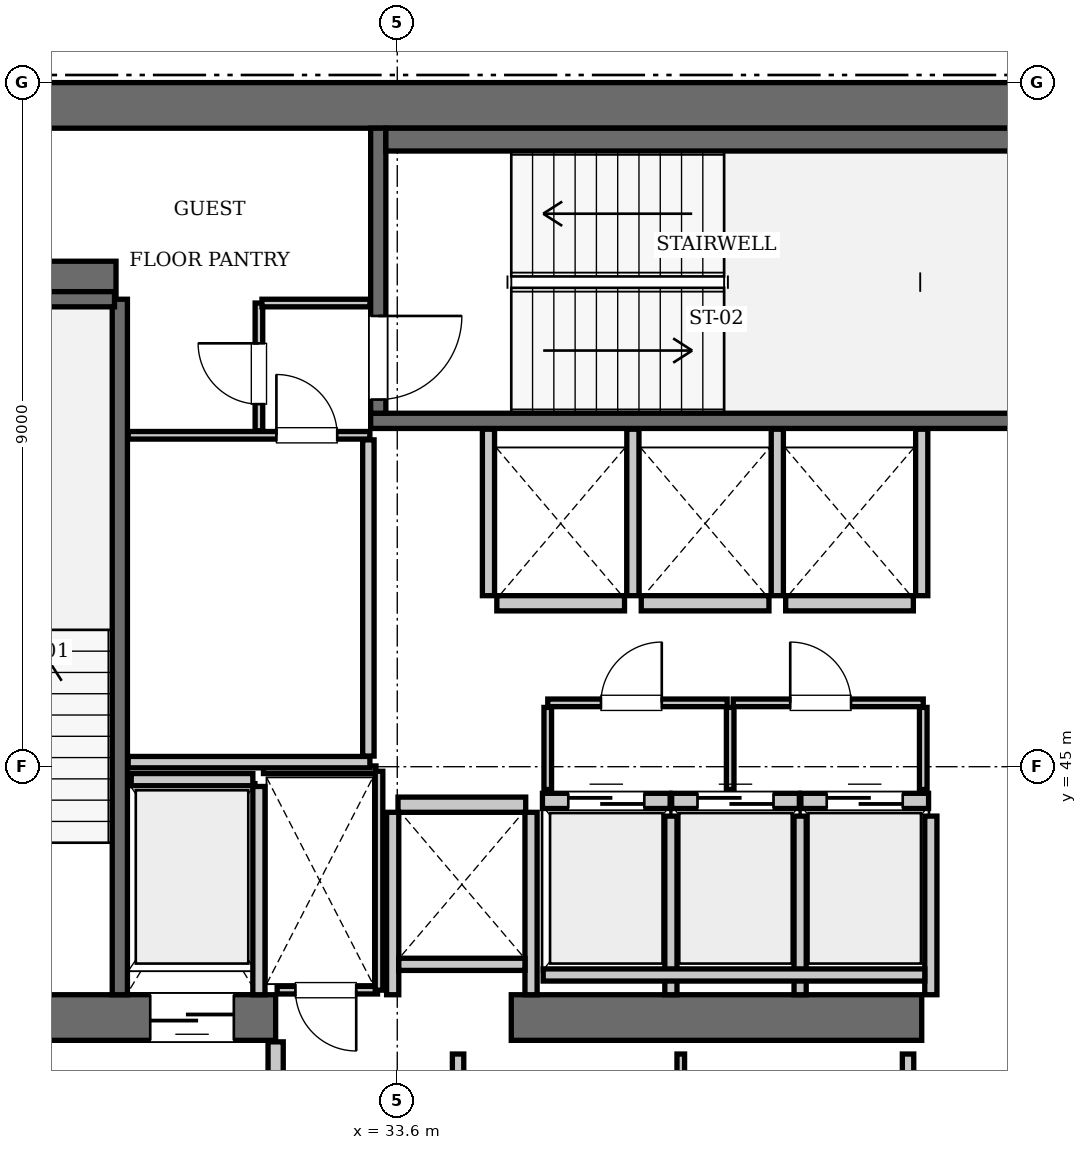
"""IFC4 building model, lengths in metres.
Left out: names, types, materials, properties, quantities, classifications, styles, units other than length and angle.
Written with IfcOpenShell. Run it as: python <this file> out.ifc"""

import sys

from ifc_helpers import new_model, si_unit, direction, frame, frame_2d, origin, place, context, subcontext, project, spatial, rectangle, extrude, element, fill, save


model = new_model("IFC4")
c1 = context("Model", 3, precision=1e-05, world=origin(), true_north=direction((0.0, 1.0)))
c2 = subcontext(c1, "Body", "Model", "MODEL_VIEW")
j1 = project(units=[si_unit("LENGTHUNIT", "METRE"), si_unit("PLANEANGLEUNIT", "RADIAN")], contexts=[c1])
p1 = place(None, origin())
s1 = spatial("IfcSite", under=j1, at=p1, CompositionType="ELEMENT")
p2 = place(p1, origin())
s2 = spatial("IfcBuilding", under=s1, at=p2, CompositionType="ELEMENT")
p3 = place(p2, frame((0.0, 0.0, 266.35)))
s3 = spatial("IfcBuildingStorey", under=s2, at=p3, CompositionType="ELEMENT", Elevation=266.35)
p4 = place(p3, frame((25.2, 53.7, 0.0), z_axis=(0.0, 0.0, 1.0), x_axis=(1.0, 0.0, 0.0)))
e1 = element("IfcWall", 1, at=p4, inside=s3, PredefinedType="SHEAR", context=c2, shape_type="SweptSolid", body=[
    extrude(rectangle(XDim=25.2, YDim=0.6, at=frame_2d((12.6, 0.0))), origin(), (0.0, 0.0, 1.0), 3.85),
])
p5 = place(p3, frame((25.2, 41.7, 0.0), z_axis=(0.0, 0.0, 1.0), x_axis=(1.0, 0.0, 0.0)))
e2 = element("IfcWall", 2, at=p5, inside=s3, PredefinedType="SHEAR", context=c2, shape_type="SweptSolid", body=[
    extrude(rectangle(XDim=6.8, YDim=0.6, at=frame_2d((3.4, 0.0))), origin(), (0.0, 0.0, 1.0), 3.85),
])
p6 = place(p5, frame((1.65, 0.0, 0.0)))
e3 = element("IfcOpeningElement", 3, at=p6, cuts=e2, PredefinedType="OPENING", context=c2, shape_type="SweptSolid", body=[
    extrude(rectangle(XDim=1.15, YDim=2.15, at=frame_2d((0.575, 1.075))), frame((0.0, 0.31, 0.0), z_axis=(0.0, -1.0, 0.0), x_axis=(1.0, 0.0, 0.0)), (0.0, 0.0, 1.0), 0.62),
])
p7 = place(p5, frame((5.15, 0.0, 0.0)))
e4 = element("IfcOpeningElement", 4, at=p7, cuts=e2, PredefinedType="OPENING", context=c2, shape_type="SweptSolid", body=[
    extrude(rectangle(XDim=1.1, YDim=2.2, at=frame_2d((0.55, 1.1))), frame((0.0, 0.31, 0.0), z_axis=(0.0, -1.0, 0.0), x_axis=(1.0, 0.0, 0.0)), (0.0, 0.0, 1.0), 0.62),
])
p8 = place(p3, frame((35.1, 41.7, 0.0), z_axis=(0.0, 0.0, 1.0), x_axis=(1.0, 0.0, 0.0)))
e5 = element("IfcWall", 5, at=p8, inside=s3, PredefinedType="SHEAR", context=c2, shape_type="SweptSolid", body=[
    extrude(rectangle(XDim=5.4, YDim=0.6, at=frame_2d((2.7, 0.0))), origin(), (0.0, 0.0, 1.0), 3.85),
])
p9 = place(p3, frame((25.8, 51.4, 0.0), z_axis=(0.0, 0.0, 1.0), x_axis=(1.0, 0.0, 0.0)))
e6 = element("IfcWall", 6, at=p9, inside=s3, PredefinedType="SHEAR", context=c2, shape_type="SweptSolid", body=[
    extrude(rectangle(XDim=4.1, YDim=0.5, at=frame_2d((2.05, 0.0))), origin(), (0.0, 0.0, 1.0), 3.85),
])
p10 = place(p3, frame((29.95, 42.0, 0.0), z_axis=(0.0, 0.0, 1.0), x_axis=(0.0, 1.0, 0.0)))
e7 = element("IfcWall", 7, at=p10, inside=s3, PredefinedType="SOLIDWALL", context=c2, shape_type="SweptSolid", body=[
    extrude(rectangle(XDim=9.15, YDim=0.2, at=frame_2d((4.575, 0.0))), origin(), (0.0, 0.0, 1.0), 3.61),
])
p11 = place(p3, frame((26.38, 51.15, 0.0), z_axis=(0.0, 0.0, 1.0), x_axis=(1.0, 0.0, 0.0)))
e8 = element("IfcWall", 8, at=p11, inside=s3, PredefinedType="SOLIDWALL", context=c2, shape_type="SweptSolid", body=[
    extrude(rectangle(XDim=3.5, YDim=0.2, at=frame_2d((1.75, 0.0))), origin(), (0.0, 0.0, 1.0), 3.61),
])
p12 = place(p3, frame((33.25, 49.55, 0.0), z_axis=(0.0, 0.0, 1.0), x_axis=(1.0, 0.0, 0.0)))
e9 = element("IfcWall", 9, at=p12, inside=s3, PredefinedType="SOLIDWALL", context=c2, shape_type="SweptSolid", body=[
    extrude(rectangle(XDim=9.1, YDim=0.2, at=frame_2d((4.55, 0.0))), origin(), (0.0, 0.0, 1.0), 3.61),
])
p13 = place(p3, frame((33.35, 49.65, 0.0), z_axis=(0.0, 0.0, 1.0), x_axis=(0.0, 1.0, 0.0)))
e10 = element("IfcWall", 10, at=p13, inside=s3, PredefinedType="SOLIDWALL", context=c2, shape_type="SweptSolid", body=[
    extrude(rectangle(XDim=3.75, YDim=0.2, at=frame_2d((1.875, 0.0))), origin(), (0.0, 0.0, 1.0), 3.61),
])
p14 = place(p13, frame((0.18, 0.0, 0.0)))
e11 = element("IfcOpeningElement", 11, at=p14, cuts=e10, PredefinedType="OPENING", context=c2, shape_type="SweptSolid", body=[
    extrude(rectangle(XDim=1.1, YDim=2.15, at=frame_2d((0.55, 1.075))), frame((0.0, 0.11, 0.0), z_axis=(0.0, -1.0, 0.0), x_axis=(1.0, 0.0, 0.0)), (0.0, 0.0, 1.0), 0.22),
])
p15 = place(p3, frame((33.45, 53.25, 0.0), z_axis=(0.0, 0.0, 1.0), x_axis=(1.0, 0.0, 0.0)))
e12 = element("IfcWall", 12, at=p15, inside=s3, PredefinedType="SOLIDWALL", context=c2, shape_type="SweptSolid", body=[
    extrude(rectangle(XDim=8.7, YDim=0.3, at=frame_2d((4.35, 0.0))), origin(), (0.0, 0.0, 1.0), 3.61),
])
p16 = place(p3, frame((35.51, 44.55, 0.0), z_axis=(0.0, 0.0, 1.0), x_axis=(1.0, 0.0, 0.0)))
e13 = element("IfcWall", 13, at=p16, inside=s3, PredefinedType="SOLIDWALL", context=c2, shape_type="SweptSolid", body=[
    extrude(rectangle(XDim=1.68, YDim=0.2, at=frame_2d((0.84, 0.0))), origin(), (0.0, 0.0, 1.0), 3.61),
])
p17 = place(p16, frame((0.34, 0.0, 0.0)))
e14 = element("IfcOpeningElement", 14, at=p17, cuts=e13, PredefinedType="OPENING", context=c2, shape_type="SweptSolid", body=[
    extrude(rectangle(XDim=1.0, YDim=2.15, at=frame_2d((0.5, 1.075))), frame((0.0, 0.11, 0.0), z_axis=(0.0, -1.0, 0.0), x_axis=(1.0, 0.0, 0.0)), (0.0, 0.0, 1.0), 0.22),
])
p18 = place(p3, frame((37.21, 44.55, 0.0), z_axis=(0.0, 0.0, 1.0), x_axis=(1.0, 0.0, 0.0)))
e15 = element("IfcWall", 15, at=p18, inside=s3, PredefinedType="SOLIDWALL", context=c2, shape_type="SweptSolid", body=[
    extrude(rectangle(XDim=1.68, YDim=0.2, at=frame_2d((0.84, 0.0))), origin(), (0.0, 0.0, 1.0), 3.61),
])
p19 = place(p18, frame((0.34, 0.0, 0.0)))
e16 = element("IfcOpeningElement", 16, at=p19, cuts=e15, PredefinedType="OPENING", context=c2, shape_type="SweptSolid", body=[
    extrude(rectangle(XDim=1.0, YDim=2.15, at=frame_2d((0.5, 1.075))), frame((0.0, 0.11, 0.0), z_axis=(0.0, -1.0, 0.0), x_axis=(1.0, 0.0, 0.0)), (0.0, 0.0, 1.0), 0.22),
])
p20 = place(p3, frame((38.91, 44.55, 0.0), z_axis=(0.0, 0.0, 1.0), x_axis=(1.0, 0.0, 0.0)))
e17 = element("IfcWall", 17, at=p20, inside=s3, PredefinedType="SOLIDWALL", context=c2, shape_type="SweptSolid", body=[
    extrude(rectangle(XDim=1.68, YDim=0.2, at=frame_2d((0.84, 0.0))), origin(), (0.0, 0.0, 1.0), 3.61),
])
p21 = place(p20, frame((0.34, 0.0, 0.0)))
e18 = element("IfcOpeningElement", 18, at=p21, cuts=e17, PredefinedType="OPENING", context=c2, shape_type="SweptSolid", body=[
    extrude(rectangle(XDim=1.0, YDim=2.15, at=frame_2d((0.5, 1.075))), frame((0.0, 0.11, 0.0), z_axis=(0.0, -1.0, 0.0), x_axis=(1.0, 0.0, 0.0)), (0.0, 0.0, 1.0), 0.22),
])
p22 = place(p3, frame((34.91, 47.15, 0.0), z_axis=(0.0, 0.0, 1.0), x_axis=(1.0, 0.0, 0.0)))
e19 = element("IfcWall", 19, at=p22, inside=s3, PredefinedType="SOLIDWALL", context=c2, shape_type="SweptSolid", body=[
    extrude(rectangle(XDim=1.68, YDim=0.2, at=frame_2d((0.84, 0.0))), origin(), (0.0, 0.0, 1.0), 3.61),
])
for number, where, z_axis, x_axis in (
    (20, (36.81, 47.15, 0.0), (0.0, 0.0, 1.0), (1.0, 0.0, 0.0)),
    (21, (38.71, 47.15, 0.0), (0.0, 0.0, 1.0), (1.0, 0.0, 0.0)),
    (22, (33.61, 44.5, 0.0), (0.0, 0.0, 1.0), (1.0, 0.0, 0.0)),
):
    element("IfcWall", number, at=place(p3, frame(where, z_axis=z_axis, x_axis=x_axis)), inside=s3, PredefinedType="SOLIDWALL", context=c2, shape_type="SweptSolid", body=[
        extrude(rectangle(XDim=1.68, YDim=0.2, at=frame_2d((0.84, 0.0))), origin(), (0.0, 0.0, 1.0), 3.61),
    ])
p23 = place(p3, frame((30.1, 44.83, 0.0), z_axis=(0.0, 0.0, 1.0), x_axis=(1.0, 0.0, 0.0)))
e23 = element("IfcWall", 23, at=p23, inside=s3, PredefinedType="SOLIDWALL", context=c2, shape_type="SweptSolid", body=[
    extrude(rectangle(XDim=1.6, YDim=0.16, at=frame_2d((0.8, 0.0))), origin(), (0.0, 0.0, 1.0), 3.61),
])
p24 = place(p3, frame((31.78, 42.0, 0.0), z_axis=(0.0, 0.0, 1.0), x_axis=(0.0, 1.0, 0.0)))
e24 = element("IfcWall", 24, at=p24, inside=s3, PredefinedType="SOLIDWALL", context=c2, shape_type="SweptSolid", body=[
    extrude(rectangle(XDim=2.74, YDim=0.16, at=frame_2d((1.37, 0.0))), origin(), (0.0, 0.0, 1.0), 3.61),
])
for number, where, z_axis, x_axis in (
    (25, (37.2, 42.0, 0.0), (0.0, 0.0, 1.0), (0.0, 1.0, 0.0)),
    (26, (38.9, 42.0, 0.0), (0.0, 0.0, 1.0), (0.0, 1.0, 0.0)),
    (27, (40.62, 42.0, 0.0), (0.0, 0.0, 1.0), (0.0, 1.0, 0.0)),
):
    element("IfcWall", number, at=place(p3, frame(where, z_axis=z_axis, x_axis=x_axis)), inside=s3, PredefinedType="SOLIDWALL", context=c2, shape_type="SweptSolid", body=[
        extrude(rectangle(XDim=2.35, YDim=0.16, at=frame_2d((1.175, 0.0))), origin(), (0.0, 0.0, 1.0), 3.61),
    ])
p25 = place(p3, frame((35.52, 42.26, 0.0), z_axis=(0.0, 0.0, 1.0), x_axis=(1.0, 0.0, 0.0)))
e28 = element("IfcWall", 28, at=p25, inside=s3, PredefinedType="SOLIDWALL", context=c2, shape_type="SweptSolid", body=[
    extrude(rectangle(XDim=5.02, YDim=0.16, at=frame_2d((2.51, 0.0))), origin(), (0.0, 0.0, 1.0), 3.61),
])
for number, where, z_axis, x_axis in (
    (29, (34.8, 47.25, 0.0), (0.0, 0.0, 1.0), (0.0, 1.0, 0.0)),
    (30, (36.7, 47.25, 0.0), (0.0, 0.0, 1.0), (0.0, 1.0, 0.0)),
    (31, (38.6, 47.25, 0.0), (0.0, 0.0, 1.0), (0.0, 1.0, 0.0)),
    (32, (40.5, 47.25, 0.0), (0.0, 0.0, 1.0), (0.0, 1.0, 0.0)),
):
    element("IfcWall", number, at=place(p3, frame(where, z_axis=z_axis, x_axis=x_axis)), inside=s3, PredefinedType="SOLIDWALL", context=c2, shape_type="SweptSolid", body=[
        extrude(rectangle(XDim=2.19, YDim=0.16, at=frame_2d((1.095, 0.0))), origin(), (0.0, 0.0, 1.0), 3.61),
    ])
for number, where, z_axis, x_axis in (
    (33, (33.54, 42.0, 0.0), (0.0, 0.0, 1.0), (0.0, 1.0, 0.0)),
    (34, (35.36, 42.0, 0.0), (0.0, 0.0, 1.0), (0.0, 1.0, 0.0)),
):
    element("IfcWall", number, at=place(p3, frame(where, z_axis=z_axis, x_axis=x_axis)), inside=s3, PredefinedType="SOLIDWALL", context=c2, shape_type="SweptSolid", body=[
        extrude(rectangle(XDim=2.4, YDim=0.16, at=frame_2d((1.2, 0.0))), origin(), (0.0, 0.0, 1.0), 3.61),
    ])
p26 = place(p3, frame((33.62, 42.4, 0.0), z_axis=(0.0, 0.0, 1.0), x_axis=(1.0, 0.0, 0.0)))
e35 = element("IfcWall", 35, at=p26, inside=s3, PredefinedType="SOLIDWALL", context=c2, shape_type="SweptSolid", body=[
    extrude(rectangle(XDim=1.66, YDim=0.16, at=frame_2d((0.83, 0.0))), origin(), (0.0, 0.0, 1.0), 3.61),
])
p27 = place(p3, frame((32.0, 38.31, 0.0), z_axis=(0.0, 0.0, 1.0), x_axis=(0.0, 1.0, 0.0)))
e36 = element("IfcWall", 36, at=p27, inside=s3, PredefinedType="PARTITIONING", context=c2, shape_type="SweptSolid", body=[
    extrude(rectangle(XDim=3.07, YDim=0.2, at=frame_2d((1.535, 0.0))), origin(), (0.0, 0.0, 1.0), 3.61),
])
p28 = place(p3, frame((32.02, 42.06, 0.0), z_axis=(0.0, 0.0, 1.0), x_axis=(1.0, 0.0, 0.0)))
e37 = element("IfcWall", 37, at=p28, inside=s3, PredefinedType="PARTITIONING", context=c2, shape_type="SweptSolid", body=[
    extrude(rectangle(XDim=1.32, YDim=0.1, at=frame_2d((0.66, 0.0))), origin(), (0.0, 0.0, 1.0), 3.61),
])
p29 = place(p28, frame((0.24, 0.0, 0.0)))
e38 = element("IfcOpeningElement", 38, at=p29, cuts=e37, PredefinedType="OPENING", context=c2, shape_type="SweptSolid", body=[
    extrude(rectangle(XDim=0.8, YDim=2.05, at=frame_2d((0.4, 1.025))), frame((0.0, 0.06, 0.0), z_axis=(0.0, -1.0, 0.0), x_axis=(1.0, 0.0, 0.0)), (0.0, 0.0, 1.0), 0.12),
])
p30 = place(p3, frame((31.84, 44.96, 0.0), z_axis=(0.0, 0.0, 1.0), x_axis=(1.0, 0.0, 0.0)))
e39 = element("IfcWall", 39, at=p30, inside=s3, PredefinedType="PARTITIONING", context=c2, shape_type="SweptSolid", body=[
    extrude(rectangle(XDim=1.48, YDim=0.1, at=frame_2d((0.74, 0.0))), origin(), (0.0, 0.0, 1.0), 3.61),
])
p31 = place(p3, frame((33.36, 42.06, 0.0), z_axis=(0.0, 0.0, 1.0), x_axis=(0.0, 1.0, 0.0)))
e40 = element("IfcWall", 40, at=p31, inside=s3, PredefinedType="PARTITIONING", context=c2, shape_type="SweptSolid", body=[
    extrude(rectangle(XDim=2.88, YDim=0.1, at=frame_2d((1.44, 0.0))), origin(), (0.0, 0.0, 1.0), 3.61),
])
p32 = place(p3, frame((35.58, 45.84, 0.0), z_axis=(0.0, 0.0, 1.0), x_axis=(1.0, 0.0, 0.0)))
e41 = element("IfcWall", 41, at=p32, inside=s3, PredefinedType="PARTITIONING", context=c2, shape_type="SweptSolid", body=[
    extrude(rectangle(XDim=2.36, YDim=0.1, at=frame_2d((1.18, 0.0))), origin(), (0.0, 0.0, 1.0), 3.61),
])
p33 = place(p32, frame((0.7, 0.0, 0.0)))
e42 = element("IfcOpeningElement", 42, at=p33, cuts=e41, PredefinedType="OPENING", context=c2, shape_type="SweptSolid", body=[
    extrude(rectangle(XDim=0.8, YDim=2.05, at=frame_2d((0.4, 1.025))), frame((0.0, 0.06, 0.0), z_axis=(0.0, -1.0, 0.0), x_axis=(1.0, 0.0, 0.0)), (0.0, 0.0, 1.0), 0.12),
])
p34 = place(p3, frame((38.02, 45.84, 0.0), z_axis=(0.0, 0.0, 1.0), x_axis=(1.0, 0.0, 0.0)))
e43 = element("IfcWall", 43, at=p34, inside=s3, PredefinedType="PARTITIONING", context=c2, shape_type="SweptSolid", body=[
    extrude(rectangle(XDim=2.5, YDim=0.1, at=frame_2d((1.25, 0.0))), origin(), (0.0, 0.0, 1.0), 3.61),
])
p35 = place(p34, frame((0.75, 0.0, 0.0)))
e44 = element("IfcOpeningElement", 44, at=p35, cuts=e43, PredefinedType="OPENING", context=c2, shape_type="SweptSolid", body=[
    extrude(rectangle(XDim=0.8, YDim=2.05, at=frame_2d((0.4, 1.025))), frame((0.0, 0.06, 0.0), z_axis=(0.0, -1.0, 0.0), x_axis=(1.0, 0.0, 0.0)), (0.0, 0.0, 1.0), 0.12),
])
for number, where, z_axis, x_axis in (
    (45, (35.58, 44.7, 0.0), (0.0, 0.0, 1.0), (0.0, 1.0, 0.0)),
    (46, (37.98, 44.7, 0.0), (0.0, 0.0, 1.0), (0.0, 1.0, 0.0)),
    (47, (40.52, 44.7, 0.0), (0.0, 0.0, 1.0), (0.0, 1.0, 0.0)),
):
    element("IfcWall", number, at=place(p3, frame(where, z_axis=z_axis, x_axis=x_axis)), inside=s3, PredefinedType="PARTITIONING", context=c2, shape_type="SweptSolid", body=[
        extrude(rectangle(XDim=1.08, YDim=0.1, at=frame_2d((0.54, 0.0))), origin(), (0.0, 0.0, 1.0), 3.61),
    ])
p36 = place(p3, frame((30.06, 45.06, 0.0), z_axis=(0.0, 0.0, 1.0), x_axis=(1.0, 0.0, 0.0)))
e48 = element("IfcWall", 48, at=p36, inside=s3, PredefinedType="PARTITIONING", context=c2, shape_type="SweptSolid", body=[
    extrude(rectangle(XDim=3.18, YDim=0.15, at=frame_2d((1.59, 0.0))), origin(), (0.0, 0.0, 1.0), 3.61),
])
p37 = place(p3, frame((33.22, 45.14, 0.0), z_axis=(0.0, 0.0, 1.0), x_axis=(0.0, 1.0, 0.0)))
e49 = element("IfcWall", 49, at=p37, inside=s3, PredefinedType="PARTITIONING", context=c2, shape_type="SweptSolid", body=[
    extrude(rectangle(XDim=4.16, YDim=0.15, at=frame_2d((2.08, 0.0))), origin(), (0.0, 0.0, 1.0), 3.61),
])
p38 = place(p3, frame((30.06, 49.36, 0.0), z_axis=(0.0, 0.0, 1.0), x_axis=(1.0, 0.0, 0.0)))
e50 = element("IfcWall", 50, at=p38, inside=s3, PredefinedType="PARTITIONING", context=c2, shape_type="SweptSolid", body=[
    extrude(rectangle(XDim=3.18, YDim=0.1, at=frame_2d((1.59, 0.0))), origin(), (0.0, 0.0, 1.0), 3.61),
])
p39 = place(p38, frame((1.95, 0.0, 0.0)))
e51 = element("IfcOpeningElement", 51, at=p39, cuts=e50, PredefinedType="OPENING", context=c2, shape_type="SweptSolid", body=[
    extrude(rectangle(XDim=0.8, YDim=2.05, at=frame_2d((0.4, 1.025))), frame((0.0, 0.06, 0.0), z_axis=(0.0, -1.0, 0.0), x_axis=(1.0, 0.0, 0.0)), (0.0, 0.0, 1.0), 0.12),
])
p40 = place(p3, frame((31.78, 49.42, 0.0), z_axis=(0.0, 0.0, 1.0), x_axis=(0.0, 1.0, 0.0)))
e52 = element("IfcWall", 52, at=p40, inside=s3, PredefinedType="PARTITIONING", context=c2, shape_type="SweptSolid", body=[
    extrude(rectangle(XDim=1.68, YDim=0.1, at=frame_2d((0.84, 0.0))), origin(), (0.0, 0.0, 1.0), 3.61),
])
p41 = place(p40, frame((0.35, 0.0, 0.0)))
e53 = element("IfcOpeningElement", 53, at=p41, cuts=e52, PredefinedType="OPENING", context=c2, shape_type="SweptSolid", body=[
    extrude(rectangle(XDim=0.8, YDim=2.05, at=frame_2d((0.4, 1.025))), frame((0.0, 0.06, 0.0), z_axis=(0.0, -1.0, 0.0), x_axis=(1.0, 0.0, 0.0)), (0.0, 0.0, 1.0), 0.12),
])
p42 = place(p3, frame((31.82, 51.1, 0.0), z_axis=(0.0, 0.0, 1.0), x_axis=(1.0, 0.0, 0.0)))
e54 = element("IfcWall", 54, at=p42, inside=s3, PredefinedType="PARTITIONING", context=c2, shape_type="SweptSolid", body=[
    extrude(rectangle(XDim=1.42, YDim=0.1, at=frame_2d((0.71, 0.0))), origin(), (0.0, 0.0, 1.0), 3.61),
])
p43 = place(p3, frame((34.4, 38.38, 0.0), z_axis=(0.0, 0.0, 1.0), x_axis=(0.0, 1.0, 0.0)))
e55 = element("IfcWall", 55, at=p43, inside=s3, PredefinedType="PARTITIONING", context=c2, shape_type="SweptSolid", body=[
    extrude(rectangle(XDim=2.84, YDim=0.15, at=frame_2d((1.42, 0.0))), origin(), (0.0, 0.0, 1.0), 3.61),
])
p44 = place(p3, frame((37.33, 38.38, 0.0), z_axis=(0.0, 0.0, 1.0), x_axis=(0.0, 1.0, 0.0)))
e56 = element("IfcWall", 56, at=p44, inside=s3, PredefinedType="PARTITIONING", context=c2, shape_type="SweptSolid", body=[
    extrude(rectangle(XDim=2.84, YDim=0.1, at=frame_2d((1.42, 0.0))), origin(), (0.0, 0.0, 1.0), 3.61),
])
p45 = place(p3, frame((40.32, 38.38, 0.0), z_axis=(0.0, 0.0, 1.0), x_axis=(0.0, 1.0, 0.0)))
e57 = element("IfcWall", 57, at=p45, inside=s3, PredefinedType="PARTITIONING", context=c2, shape_type="SweptSolid", body=[
    extrude(rectangle(XDim=2.84, YDim=0.15, at=frame_2d((1.42, 0.0))), origin(), (0.0, 0.0, 1.0), 3.61),
])
p46 = place(p14, frame((1.1, 0.0, 0.0), z_axis=(0.0, 0.0, 1.0), x_axis=(-1.0, 0.0, 0.0)))
e58 = element("IfcDoor", 58, at=p46, inside=s3, OperationType="SINGLE_SWING_LEFT", PredefinedType="DOOR", context=c2, shape_type="SweptSolid", body=[
    extrude(rectangle(XDim=1.1, YDim=2.15, at=frame_2d((0.55, 1.075))), frame((0.0, 0.025, 0.0), z_axis=(0.0, -1.0, 0.0), x_axis=(1.0, 0.0, 0.0)), (0.0, 0.0, 1.0), 0.05),
])
fill(e11, e58)
p47 = place(p17, origin())
e59 = element("IfcDoor", 59, at=p47, inside=s3, OperationType="SLIDING_TO_LEFT", PredefinedType="DOOR", context=c2, shape_type="SweptSolid", body=[
    extrude(rectangle(XDim=1.0, YDim=2.15, at=frame_2d((0.5, 1.075))), frame((0.0, 0.025, 0.0), z_axis=(0.0, -1.0, 0.0), x_axis=(1.0, 0.0, 0.0)), (0.0, 0.0, 1.0), 0.05),
])
fill(e14, e59)
p48 = place(p19, origin())
e60 = element("IfcDoor", 60, at=p48, inside=s3, OperationType="SLIDING_TO_LEFT", PredefinedType="DOOR", context=c2, shape_type="SweptSolid", body=[
    extrude(rectangle(XDim=1.0, YDim=2.15, at=frame_2d((0.5, 1.075))), frame((0.0, 0.025, 0.0), z_axis=(0.0, -1.0, 0.0), x_axis=(1.0, 0.0, 0.0)), (0.0, 0.0, 1.0), 0.05),
])
fill(e16, e60)
p49 = place(p21, origin())
e61 = element("IfcDoor", 61, at=p49, inside=s3, OperationType="SLIDING_TO_LEFT", PredefinedType="DOOR", context=c2, shape_type="SweptSolid", body=[
    extrude(rectangle(XDim=1.0, YDim=2.15, at=frame_2d((0.5, 1.075))), frame((0.0, 0.025, 0.0), z_axis=(0.0, -1.0, 0.0), x_axis=(1.0, 0.0, 0.0)), (0.0, 0.0, 1.0), 0.05),
])
fill(e18, e61)
p50 = place(p7, frame((1.1, 0.0, 0.0), z_axis=(0.0, 0.0, 1.0), x_axis=(-1.0, 0.0, 0.0)))
e62 = element("IfcDoor", 62, at=p50, inside=s3, OperationType="SLIDING_TO_LEFT", PredefinedType="DOOR", context=c2, shape_type="SweptSolid", body=[
    extrude(rectangle(XDim=1.1, YDim=2.2, at=frame_2d((0.55, 1.1))), frame((0.0, 0.025, 0.0), z_axis=(0.0, -1.0, 0.0), x_axis=(1.0, 0.0, 0.0)), (0.0, 0.0, 1.0), 0.05),
])
fill(e4, e62)
p51 = place(p29, frame((0.8, 0.0, 0.0), z_axis=(0.0, 0.0, 1.0), x_axis=(-1.0, 0.0, 0.0)))
e63 = element("IfcDoor", 63, at=p51, inside=s3, OperationType="SINGLE_SWING_LEFT", PredefinedType="DOOR", context=c2, shape_type="SweptSolid", body=[
    extrude(rectangle(XDim=0.8, YDim=2.05, at=frame_2d((0.4, 1.025))), frame((0.0, 0.025, 0.0), z_axis=(0.0, -1.0, 0.0), x_axis=(1.0, 0.0, 0.0)), (0.0, 0.0, 1.0), 0.05),
])
fill(e38, e63)
p52 = place(p33, origin())
e64 = element("IfcDoor", 64, at=p52, inside=s3, OperationType="SINGLE_SWING_RIGHT", PredefinedType="DOOR", context=c2, shape_type="SweptSolid", body=[
    extrude(rectangle(XDim=0.8, YDim=2.05, at=frame_2d((0.4, 1.025))), frame((0.0, 0.025, 0.0), z_axis=(0.0, -1.0, 0.0), x_axis=(1.0, 0.0, 0.0)), (0.0, 0.0, 1.0), 0.05),
])
fill(e42, e64)
p53 = place(p35, origin())
e65 = element("IfcDoor", 65, at=p53, inside=s3, OperationType="SINGLE_SWING_LEFT", PredefinedType="DOOR", context=c2, shape_type="SweptSolid", body=[
    extrude(rectangle(XDim=0.8, YDim=2.05, at=frame_2d((0.4, 1.025))), frame((0.0, 0.025, 0.0), z_axis=(0.0, -1.0, 0.0), x_axis=(1.0, 0.0, 0.0)), (0.0, 0.0, 1.0), 0.05),
])
fill(e44, e65)
p54 = place(p39, origin())
e66 = element("IfcDoor", 66, at=p54, inside=s3, OperationType="SINGLE_SWING_LEFT", PredefinedType="DOOR", context=c2, shape_type="SweptSolid", body=[
    extrude(rectangle(XDim=0.8, YDim=2.05, at=frame_2d((0.4, 1.025))), frame((0.0, 0.025, 0.0), z_axis=(0.0, -1.0, 0.0), x_axis=(1.0, 0.0, 0.0)), (0.0, 0.0, 1.0), 0.05),
])
fill(e51, e66)
p55 = place(p41, origin())
e67 = element("IfcDoor", 67, at=p55, inside=s3, OperationType="SINGLE_SWING_RIGHT", PredefinedType="DOOR", context=c2, shape_type="SweptSolid", body=[
    extrude(rectangle(XDim=0.8, YDim=2.05, at=frame_2d((0.4, 1.025))), frame((0.0, 0.025, 0.0), z_axis=(0.0, -1.0, 0.0), x_axis=(1.0, 0.0, 0.0)), (0.0, 0.0, 1.0), 0.05),
])
fill(e53, e67)
save(model, sys.argv[1])
